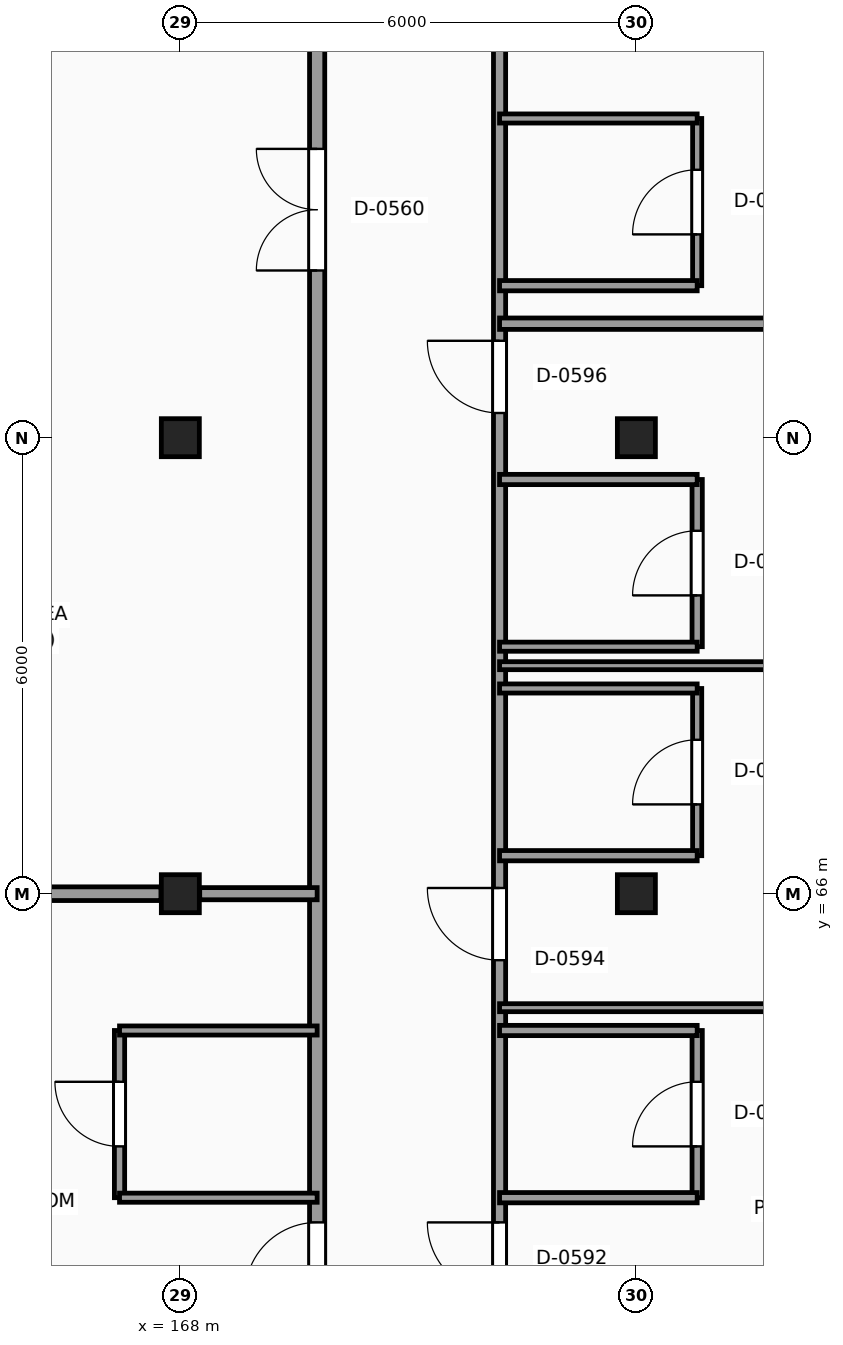
"""IFC4 building model, lengths in metres.
Left out: names, types, materials, properties, quantities, classifications, styles, units other than length and angle.
Written with IfcOpenShell. Run it as: python <this file> out.ifc"""

import sys

from ifc_helpers import new_model, si_unit, direction, frame, frame_2d, origin, origin_2d, place, context, subcontext, project, spatial, rectangle, extrude, element, fill, save


model = new_model("IFC4")
c1 = context("Model", 3, precision=1e-05, world=origin(), true_north=direction((0.0, 1.0)))
c2 = subcontext(c1, "Body", "Model", "MODEL_VIEW")
j1 = project(units=[si_unit("LENGTHUNIT", "METRE"), si_unit("PLANEANGLEUNIT", "RADIAN")], contexts=[c1])
p1 = place(None, origin())
s1 = spatial("IfcSite", under=j1, at=p1, CompositionType="ELEMENT")
p2 = place(p1, origin())
s2 = spatial("IfcBuilding", under=s1, at=p2, CompositionType="ELEMENT")
p3 = place(p2, frame((0.0, 0.0, 41.4)))
s3 = spatial("IfcBuildingStorey", under=s2, at=p3, CompositionType="ELEMENT", Elevation=41.4)
for number, where, z_axis, x_axis in (
    (1, (168.0, 66.0, 0.0), (0.0, 0.0, 1.0), (1.0, 0.0, 0.0)),
    (2, (168.0, 72.0, 0.0), (0.0, 0.0, 1.0), (1.0, 0.0, 0.0)),
    (3, (174.0, 66.0, 0.0), (0.0, 0.0, 1.0), (1.0, 0.0, 0.0)),
    (4, (174.0, 72.0, 0.0), (0.0, 0.0, 1.0), (1.0, 0.0, 0.0)),
):
    element("IfcColumn", number, at=place(p3, frame(where, z_axis=z_axis, x_axis=x_axis)), inside=s3, PredefinedType="COLUMN", context=c2, shape_type="SweptSolid", body=[
        extrude(rectangle(XDim=0.5, YDim=0.5, at=origin_2d()), origin(), (0.0, 0.0, 1.0), 3.3),
    ])
p4 = place(p3, frame((167.2, 62.0, 0.0), z_axis=(0.0, 0.0, 1.0), x_axis=(0.0, 1.0, 0.0)))
e5 = element("IfcWall", 5, at=p4, inside=s3, PredefinedType="PARTITIONING", context=c2, shape_type="SweptSolid", body=[
    extrude(rectangle(XDim=2.2, YDim=0.135, at=frame_2d((1.1, 0.0))), origin(), (0.0, 0.0, 1.0), 3.06),
])
p5 = place(p4, frame((0.675, 0.0, 0.0)))
e6 = element("IfcOpeningElement", 6, at=p5, cuts=e5, PredefinedType="OPENING", context=c2, shape_type="SweptSolid", body=[
    extrude(rectangle(XDim=0.85, YDim=2.1, at=frame_2d((0.425, 1.05))), frame((0.0, 0.078, 0.0), z_axis=(0.0, -1.0, 0.0), x_axis=(1.0, 0.0, 0.0)), (0.0, 0.0, 1.0), 0.155),
])
p6 = place(p3, frame((169.8, 42.275, 0.0), z_axis=(0.0, 0.0, 1.0), x_axis=(0.0, 1.0, 0.0)))
e7 = element("IfcWall", 7, at=p6, inside=s3, PredefinedType="PARTITIONING", context=c2, shape_type="SweptSolid", body=[
    extrude(rectangle(XDim=65.545, YDim=0.2, at=frame_2d((32.772, 0.0))), origin(), (0.0, 0.0, 1.0), 3.06),
])
p7 = place(p6, frame((50.125, 0.0, 0.0)))
e8 = element("IfcOpeningElement", 8, at=p7, cuts=e7, PredefinedType="OPENING", context=c2, shape_type="SweptSolid", body=[
    extrude(rectangle(XDim=1.2, YDim=2.2, at=frame_2d((0.6, 1.1))), frame((0.0, 0.11, 0.0), z_axis=(0.0, -1.0, 0.0), x_axis=(1.0, 0.0, 0.0)), (0.0, 0.0, 1.0), 0.22),
])
p8 = place(p6, frame((31.925, 0.0, 0.0)))
e9 = element("IfcOpeningElement", 9, at=p8, cuts=e7, PredefinedType="OPENING", context=c2, shape_type="SweptSolid", body=[
    extrude(rectangle(XDim=1.6, YDim=2.25, at=frame_2d((0.8, 1.125))), frame((0.0, 0.11, 0.0), z_axis=(0.0, -1.0, 0.0), x_axis=(1.0, 0.0, 0.0)), (0.0, 0.0, 1.0), 0.22),
])
p9 = place(p6, frame((0.4, 0.0, 0.0)))
e10 = element("IfcOpeningElement", 10, at=p9, cuts=e7, PredefinedType="OPENING", context=c2, shape_type="SweptSolid", body=[
    extrude(rectangle(XDim=0.95, YDim=2.1, at=frame_2d((0.475, 1.05))), frame((0.0, 0.11, 0.0), z_axis=(0.0, -1.0, 0.0), x_axis=(1.0, 0.0, 0.0)), (0.0, 0.0, 1.0), 0.22),
])
p10 = place(p6, frame((6.45, 0.0, 0.0)))
e11 = element("IfcOpeningElement", 11, at=p10, cuts=e7, PredefinedType="OPENING", context=c2, shape_type="SweptSolid", body=[
    extrude(rectangle(XDim=0.95, YDim=2.1, at=frame_2d((0.475, 1.05))), frame((0.0, 0.11, 0.0), z_axis=(0.0, -1.0, 0.0), x_axis=(1.0, 0.0, 0.0)), (0.0, 0.0, 1.0), 0.22),
])
p11 = place(p6, frame((12.45, 0.0, 0.0)))
e12 = element("IfcOpeningElement", 12, at=p11, cuts=e7, PredefinedType="OPENING", context=c2, shape_type="SweptSolid", body=[
    extrude(rectangle(XDim=0.95, YDim=2.1, at=frame_2d((0.475, 1.05))), frame((0.0, 0.11, 0.0), z_axis=(0.0, -1.0, 0.0), x_axis=(1.0, 0.0, 0.0)), (0.0, 0.0, 1.0), 0.22),
])
p12 = place(p6, frame((18.45, 0.0, 0.0)))
e13 = element("IfcOpeningElement", 13, at=p12, cuts=e7, PredefinedType="OPENING", context=c2, shape_type="SweptSolid", body=[
    extrude(rectangle(XDim=0.95, YDim=2.1, at=frame_2d((0.475, 1.05))), frame((0.0, 0.11, 0.0), z_axis=(0.0, -1.0, 0.0), x_axis=(1.0, 0.0, 0.0)), (0.0, 0.0, 1.0), 0.22),
])
p13 = place(p6, frame((54.45, 0.0, 0.0)))
e14 = element("IfcOpeningElement", 14, at=p13, cuts=e7, PredefinedType="OPENING", context=c2, shape_type="SweptSolid", body=[
    extrude(rectangle(XDim=0.95, YDim=2.1, at=frame_2d((0.475, 1.05))), frame((0.0, 0.11, 0.0), z_axis=(0.0, -1.0, 0.0), x_axis=(1.0, 0.0, 0.0)), (0.0, 0.0, 1.0), 0.22),
])
p14 = place(p6, frame((60.45, 0.0, 0.0)))
e15 = element("IfcOpeningElement", 15, at=p14, cuts=e7, PredefinedType="OPENING", context=c2, shape_type="SweptSolid", body=[
    extrude(rectangle(XDim=0.95, YDim=2.1, at=frame_2d((0.475, 1.05))), frame((0.0, 0.11, 0.0), z_axis=(0.0, -1.0, 0.0), x_axis=(1.0, 0.0, 0.0)), (0.0, 0.0, 1.0), 0.22),
])
p15 = place(p3, frame((172.2, 42.275, 0.0), z_axis=(0.0, 0.0, 1.0), x_axis=(0.0, 1.0, 0.0)))
e16 = element("IfcWall", 16, at=p15, inside=s3, PredefinedType="PARTITIONING", context=c2, shape_type="SweptSolid", body=[
    extrude(rectangle(XDim=65.545, YDim=0.16, at=frame_2d((32.772, 0.0))), origin(), (0.0, 0.0, 1.0), 3.06),
])
p16 = place(p15, frame((0.4, 0.0, 0.0)))
e17 = element("IfcOpeningElement", 17, at=p16, cuts=e16, PredefinedType="OPENING", context=c2, shape_type="SweptSolid", body=[
    extrude(rectangle(XDim=0.95, YDim=2.1, at=frame_2d((0.475, 1.05))), frame((0.0, 0.09, 0.0), z_axis=(0.0, -1.0, 0.0), x_axis=(1.0, 0.0, 0.0)), (0.0, 0.0, 1.0), 0.18),
])
p17 = place(p15, frame((4.85, 0.0, 0.0)))
e18 = element("IfcOpeningElement", 18, at=p17, cuts=e16, PredefinedType="OPENING", context=c2, shape_type="SweptSolid", body=[
    extrude(rectangle(XDim=0.95, YDim=2.1, at=frame_2d((0.475, 1.05))), frame((0.0, 0.09, 0.0), z_axis=(0.0, -1.0, 0.0), x_axis=(1.0, 0.0, 0.0)), (0.0, 0.0, 1.0), 0.18),
])
p18 = place(p15, frame((9.35, 0.0, 0.0)))
e19 = element("IfcOpeningElement", 19, at=p18, cuts=e16, PredefinedType="OPENING", context=c2, shape_type="SweptSolid", body=[
    extrude(rectangle(XDim=0.95, YDim=2.1, at=frame_2d((0.475, 1.05))), frame((0.0, 0.09, 0.0), z_axis=(0.0, -1.0, 0.0), x_axis=(1.0, 0.0, 0.0)), (0.0, 0.0, 1.0), 0.18),
])
p19 = place(p15, frame((18.45, 0.0, 0.0)))
e20 = element("IfcOpeningElement", 20, at=p19, cuts=e16, PredefinedType="OPENING", context=c2, shape_type="SweptSolid", body=[
    extrude(rectangle(XDim=0.95, YDim=2.1, at=frame_2d((0.475, 1.05))), frame((0.0, 0.09, 0.0), z_axis=(0.0, -1.0, 0.0), x_axis=(1.0, 0.0, 0.0)), (0.0, 0.0, 1.0), 0.18),
])
p20 = place(p15, frame((22.85, 0.0, 0.0)))
e21 = element("IfcOpeningElement", 21, at=p20, cuts=e16, PredefinedType="OPENING", context=c2, shape_type="SweptSolid", body=[
    extrude(rectangle(XDim=0.95, YDim=2.1, at=frame_2d((0.475, 1.05))), frame((0.0, 0.09, 0.0), z_axis=(0.0, -1.0, 0.0), x_axis=(1.0, 0.0, 0.0)), (0.0, 0.0, 1.0), 0.18),
])
p21 = place(p15, frame((30.05, 0.0, 0.0)))
e22 = element("IfcOpeningElement", 22, at=p21, cuts=e16, PredefinedType="OPENING", context=c2, shape_type="SweptSolid", body=[
    extrude(rectangle(XDim=0.95, YDim=2.1, at=frame_2d((0.475, 1.05))), frame((0.0, 0.09, 0.0), z_axis=(0.0, -1.0, 0.0), x_axis=(1.0, 0.0, 0.0)), (0.0, 0.0, 1.0), 0.18),
])
p22 = place(p15, frame((38.3, 0.0, 0.0)))
e23 = element("IfcOpeningElement", 23, at=p22, cuts=e16, PredefinedType="OPENING", context=c2, shape_type="SweptSolid", body=[
    extrude(rectangle(XDim=0.95, YDim=2.1, at=frame_2d((0.475, 1.05))), frame((0.0, 0.09, 0.0), z_axis=(0.0, -1.0, 0.0), x_axis=(1.0, 0.0, 0.0)), (0.0, 0.0, 1.0), 0.18),
])
p23 = place(p15, frame((40.85, 0.0, 0.0)))
e24 = element("IfcOpeningElement", 24, at=p23, cuts=e16, PredefinedType="OPENING", context=c2, shape_type="SweptSolid", body=[
    extrude(rectangle(XDim=0.95, YDim=2.1, at=frame_2d((0.475, 1.05))), frame((0.0, 0.09, 0.0), z_axis=(0.0, -1.0, 0.0), x_axis=(1.0, 0.0, 0.0)), (0.0, 0.0, 1.0), 0.18),
])
p24 = place(p15, frame((48.05, 0.0, 0.0)))
e25 = element("IfcOpeningElement", 25, at=p24, cuts=e16, PredefinedType="OPENING", context=c2, shape_type="SweptSolid", body=[
    extrude(rectangle(XDim=0.95, YDim=2.1, at=frame_2d((0.475, 1.05))), frame((0.0, 0.09, 0.0), z_axis=(0.0, -1.0, 0.0), x_axis=(1.0, 0.0, 0.0)), (0.0, 0.0, 1.0), 0.18),
])
p25 = place(p15, frame((52.25, 0.0, 0.0)))
e26 = element("IfcOpeningElement", 26, at=p25, cuts=e16, PredefinedType="OPENING", context=c2, shape_type="SweptSolid", body=[
    extrude(rectangle(XDim=0.95, YDim=2.1, at=frame_2d((0.475, 1.05))), frame((0.0, 0.09, 0.0), z_axis=(0.0, -1.0, 0.0), x_axis=(1.0, 0.0, 0.0)), (0.0, 0.0, 1.0), 0.18),
])
p26 = place(p15, frame((54.45, 0.0, 0.0)))
e27 = element("IfcOpeningElement", 27, at=p26, cuts=e16, PredefinedType="OPENING", context=c2, shape_type="SweptSolid", body=[
    extrude(rectangle(XDim=0.95, YDim=2.1, at=frame_2d((0.475, 1.05))), frame((0.0, 0.09, 0.0), z_axis=(0.0, -1.0, 0.0), x_axis=(1.0, 0.0, 0.0)), (0.0, 0.0, 1.0), 0.18),
])
p27 = place(p15, frame((60.45, 0.0, 0.0)))
e28 = element("IfcOpeningElement", 28, at=p27, cuts=e16, PredefinedType="OPENING", context=c2, shape_type="SweptSolid", body=[
    extrude(rectangle(XDim=0.95, YDim=2.1, at=frame_2d((0.475, 1.05))), frame((0.0, 0.09, 0.0), z_axis=(0.0, -1.0, 0.0), x_axis=(1.0, 0.0, 0.0)), (0.0, 0.0, 1.0), 0.18),
])
p28 = place(p3, frame((174.8, 62.0, 0.0), z_axis=(0.0, 0.0, 1.0), x_axis=(0.0, 1.0, 0.0)))
e29 = element("IfcWall", 29, at=p28, inside=s3, PredefinedType="PARTITIONING", context=c2, shape_type="SweptSolid", body=[
    extrude(rectangle(XDim=2.2, YDim=0.135, at=frame_2d((1.1, 0.0))), origin(), (0.0, 0.0, 1.0), 3.06),
])
p29 = place(p28, frame((0.675, 0.0, 0.0)))
e30 = element("IfcOpeningElement", 30, at=p29, cuts=e29, PredefinedType="OPENING", context=c2, shape_type="SweptSolid", body=[
    extrude(rectangle(XDim=0.85, YDim=2.1, at=frame_2d((0.425, 1.05))), frame((0.0, 0.078, 0.0), z_axis=(0.0, -1.0, 0.0), x_axis=(1.0, 0.0, 0.0)), (0.0, 0.0, 1.0), 0.155),
])
p30 = place(p3, frame((174.8, 66.5, 0.0), z_axis=(0.0, 0.0, 1.0), x_axis=(0.0, 1.0, 0.0)))
e31 = element("IfcWall", 31, at=p30, inside=s3, PredefinedType="PARTITIONING", context=c2, shape_type="SweptSolid", body=[
    extrude(rectangle(XDim=2.2, YDim=0.12, at=frame_2d((1.1, 0.0))), origin(), (0.0, 0.0, 1.0), 3.06),
])
p31 = place(p30, frame((0.675, 0.0, 0.0)))
e32 = element("IfcOpeningElement", 32, at=p31, cuts=e31, PredefinedType="OPENING", context=c2, shape_type="SweptSolid", body=[
    extrude(rectangle(XDim=0.85, YDim=2.1, at=frame_2d((0.425, 1.05))), frame((0.0, 0.07, 0.0), z_axis=(0.0, -1.0, 0.0), x_axis=(1.0, 0.0, 0.0)), (0.0, 0.0, 1.0), 0.14),
])
p32 = place(p3, frame((174.8, 69.25, 0.0), z_axis=(0.0, 0.0, 1.0), x_axis=(0.0, 1.0, 0.0)))
e33 = element("IfcWall", 33, at=p32, inside=s3, PredefinedType="PARTITIONING", context=c2, shape_type="SweptSolid", body=[
    extrude(rectangle(XDim=2.2, YDim=0.135, at=frame_2d((1.1, 0.0))), origin(), (0.0, 0.0, 1.0), 3.06),
])
p33 = place(p32, frame((0.675, 0.0, 0.0)))
e34 = element("IfcOpeningElement", 34, at=p33, cuts=e33, PredefinedType="OPENING", context=c2, shape_type="SweptSolid", body=[
    extrude(rectangle(XDim=0.85, YDim=2.1, at=frame_2d((0.425, 1.05))), frame((0.0, 0.078, 0.0), z_axis=(0.0, -1.0, 0.0), x_axis=(1.0, 0.0, 0.0)), (0.0, 0.0, 1.0), 0.155),
])
p34 = place(p3, frame((174.8, 74.0, 0.0), z_axis=(0.0, 0.0, 1.0), x_axis=(0.0, 1.0, 0.0)))
e35 = element("IfcWall", 35, at=p34, inside=s3, PredefinedType="PARTITIONING", context=c2, shape_type="SweptSolid", body=[
    extrude(rectangle(XDim=2.2, YDim=0.12, at=frame_2d((1.1, 0.0))), origin(), (0.0, 0.0, 1.0), 3.06),
])
p35 = place(p34, frame((0.675, 0.0, 0.0)))
e36 = element("IfcOpeningElement", 36, at=p35, cuts=e35, PredefinedType="OPENING", context=c2, shape_type="SweptSolid", body=[
    extrude(rectangle(XDim=0.85, YDim=2.1, at=frame_2d((0.425, 1.05))), frame((0.0, 0.07, 0.0), z_axis=(0.0, -1.0, 0.0), x_axis=(1.0, 0.0, 0.0)), (0.0, 0.0, 1.0), 0.14),
])
p36 = place(p3, frame((167.2, 62.0, 0.0), z_axis=(0.0, 0.0, 1.0), x_axis=(1.0, 0.0, 0.0)))
e37 = element("IfcWall", 37, at=p36, inside=s3, PredefinedType="PARTITIONING", context=c2, shape_type="SweptSolid", body=[
    extrude(rectangle(XDim=2.6, YDim=0.12, at=frame_2d((1.3, 0.0))), origin(), (0.0, 0.0, 1.0), 3.06),
])
p37 = place(p3, frame((172.2, 62.0, 0.0), z_axis=(0.0, 0.0, 1.0), x_axis=(1.0, 0.0, 0.0)))
e38 = element("IfcWall", 38, at=p37, inside=s3, PredefinedType="PARTITIONING", context=c2, shape_type="SweptSolid", body=[
    extrude(rectangle(XDim=2.6, YDim=0.135, at=frame_2d((1.3, 0.0))), origin(), (0.0, 0.0, 1.0), 3.06),
])
p38 = place(p3, frame((167.2, 64.2, 0.0), z_axis=(0.0, 0.0, 1.0), x_axis=(1.0, 0.0, 0.0)))
e39 = element("IfcWall", 39, at=p38, inside=s3, PredefinedType="PARTITIONING", context=c2, shape_type="SweptSolid", body=[
    extrude(rectangle(XDim=2.6, YDim=0.12, at=frame_2d((1.3, 0.0))), origin(), (0.0, 0.0, 1.0), 3.06),
])
p39 = place(p3, frame((172.2, 64.2, 0.0), z_axis=(0.0, 0.0, 1.0), x_axis=(1.0, 0.0, 0.0)))
e40 = element("IfcWall", 40, at=p39, inside=s3, PredefinedType="PARTITIONING", context=c2, shape_type="SweptSolid", body=[
    extrude(rectangle(XDim=2.6, YDim=0.135, at=frame_2d((1.3, 0.0))), origin(), (0.0, 0.0, 1.0), 3.06),
])
p40 = place(p3, frame((172.2, 64.5, 0.0), z_axis=(0.0, 0.0, 1.0), x_axis=(1.0, 0.0, 0.0)))
e41 = element("IfcWall", 41, at=p40, inside=s3, PredefinedType="PARTITIONING", context=c2, shape_type="SweptSolid", body=[
    extrude(rectangle(XDim=7.585, YDim=0.105, at=frame_2d((3.792, 0.0))), origin(), (0.0, 0.0, 1.0), 3.06),
])
p41 = place(p3, frame((162.28, 66.0, 0.0), z_axis=(0.0, 0.0, 1.0), x_axis=(1.0, 0.0, 0.0)))
e42 = element("IfcWall", 42, at=p41, inside=s3, PredefinedType="PARTITIONING", context=c2, shape_type="SweptSolid", body=[
    extrude(rectangle(XDim=5.465, YDim=0.18, at=frame_2d((2.732, 0.0))), origin(), (0.0, 0.0, 1.0), 2.26),
])
p42 = place(p3, frame((168.255, 66.0, 0.0), z_axis=(0.0, 0.0, 1.0), x_axis=(1.0, 0.0, 0.0)))
e43 = element("IfcWall", 43, at=p42, inside=s3, PredefinedType="PARTITIONING", context=c2, shape_type="SweptSolid", body=[
    extrude(rectangle(XDim=1.545, YDim=0.16, at=frame_2d((0.772, 0.0))), origin(), (0.0, 0.0, 1.0), 2.26),
])
p43 = place(p3, frame((172.2, 66.5, 0.0), z_axis=(0.0, 0.0, 1.0), x_axis=(1.0, 0.0, 0.0)))
e44 = element("IfcWall", 44, at=p43, inside=s3, PredefinedType="PARTITIONING", context=c2, shape_type="SweptSolid", body=[
    extrude(rectangle(XDim=2.6, YDim=0.135, at=frame_2d((1.3, 0.0))), origin(), (0.0, 0.0, 1.0), 3.06),
])
p44 = place(p3, frame((172.2, 68.7, 0.0), z_axis=(0.0, 0.0, 1.0), x_axis=(1.0, 0.0, 0.0)))
e45 = element("IfcWall", 45, at=p44, inside=s3, PredefinedType="PARTITIONING", context=c2, shape_type="SweptSolid", body=[
    extrude(rectangle(XDim=2.6, YDim=0.12, at=frame_2d((1.3, 0.0))), origin(), (0.0, 0.0, 1.0), 3.06),
])
p45 = place(p3, frame((172.2, 69.0, 0.0), z_axis=(0.0, 0.0, 1.0), x_axis=(1.0, 0.0, 0.0)))
e46 = element("IfcWall", 46, at=p45, inside=s3, PredefinedType="PARTITIONING", context=c2, shape_type="SweptSolid", body=[
    extrude(rectangle(XDim=7.525, YDim=0.105, at=frame_2d((3.763, 0.0))), origin(), (0.0, 0.0, 1.0), 3.06),
])
p46 = place(p3, frame((172.2, 69.25, 0.0), z_axis=(0.0, 0.0, 1.0), x_axis=(1.0, 0.0, 0.0)))
e47 = element("IfcWall", 47, at=p46, inside=s3, PredefinedType="PARTITIONING", context=c2, shape_type="SweptSolid", body=[
    extrude(rectangle(XDim=2.6, YDim=0.12, at=frame_2d((1.3, 0.0))), origin(), (0.0, 0.0, 1.0), 3.06),
])
p47 = place(p3, frame((172.2, 71.45, 0.0), z_axis=(0.0, 0.0, 1.0), x_axis=(1.0, 0.0, 0.0)))
e48 = element("IfcWall", 48, at=p47, inside=s3, PredefinedType="PARTITIONING", context=c2, shape_type="SweptSolid", body=[
    extrude(rectangle(XDim=2.6, YDim=0.135, at=frame_2d((1.3, 0.0))), origin(), (0.0, 0.0, 1.0), 3.06),
])
p48 = place(p3, frame((172.2, 73.5, 0.0), z_axis=(0.0, 0.0, 1.0), x_axis=(1.0, 0.0, 0.0)))
e49 = element("IfcWall", 49, at=p48, inside=s3, PredefinedType="PARTITIONING", context=c2, shape_type="SweptSolid", body=[
    extrude(rectangle(XDim=7.545, YDim=0.15, at=frame_2d((3.772, 0.0))), origin(), (0.0, 0.0, 1.0), 3.06),
])
p49 = place(p3, frame((172.2, 74.0, 0.0), z_axis=(0.0, 0.0, 1.0), x_axis=(1.0, 0.0, 0.0)))
e50 = element("IfcWall", 50, at=p49, inside=s3, PredefinedType="PARTITIONING", context=c2, shape_type="SweptSolid", body=[
    extrude(rectangle(XDim=2.6, YDim=0.135, at=frame_2d((1.3, 0.0))), origin(), (0.0, 0.0, 1.0), 3.06),
])
p50 = place(p3, frame((172.2, 76.2, 0.0), z_axis=(0.0, 0.0, 1.0), x_axis=(1.0, 0.0, 0.0)))
e51 = element("IfcWall", 51, at=p50, inside=s3, PredefinedType="PARTITIONING", context=c2, shape_type="SweptSolid", body=[
    extrude(rectangle(XDim=2.6, YDim=0.12, at=frame_2d((1.3, 0.0))), origin(), (0.0, 0.0, 1.0), 3.06),
])
p51 = place(p8, origin())
e52 = element("IfcDoor", 52, at=p51, inside=s3, OperationType="DOUBLE_DOOR_SINGLE_SWING", PredefinedType="DOOR", context=c2, shape_type="SweptSolid", body=[
    extrude(rectangle(XDim=1.6, YDim=2.25, at=frame_2d((0.8, 1.125))), frame((0.0, 0.025, 0.0), z_axis=(0.0, -1.0, 0.0), x_axis=(1.0, 0.0, 0.0)), (0.0, 0.0, 1.0), 0.05),
])
fill(e9, e52)
p52 = place(p29, origin())
e53 = element("IfcDoor", 53, at=p52, inside=s3, OperationType="SINGLE_SWING_LEFT", PredefinedType="DOOR", context=c2, shape_type="SweptSolid", body=[
    extrude(rectangle(XDim=0.85, YDim=2.1, at=frame_2d((0.425, 1.05))), frame((0.0, 0.025, 0.0), z_axis=(0.0, -1.0, 0.0), x_axis=(1.0, 0.0, 0.0)), (0.0, 0.0, 1.0), 0.05),
])
fill(e30, e53)
p53 = place(p19, origin())
e54 = element("IfcDoor", 54, at=p53, inside=s3, OperationType="SINGLE_SWING_RIGHT", PredefinedType="DOOR", context=c2, shape_type="SweptSolid", body=[
    extrude(rectangle(XDim=0.95, YDim=2.1, at=frame_2d((0.475, 1.05))), frame((0.0, 0.025, 0.0), z_axis=(0.0, -1.0, 0.0), x_axis=(1.0, 0.0, 0.0)), (0.0, 0.0, 1.0), 0.05),
])
fill(e20, e54)
p54 = place(p31, origin())
e55 = element("IfcDoor", 55, at=p54, inside=s3, OperationType="SINGLE_SWING_LEFT", PredefinedType="DOOR", context=c2, shape_type="SweptSolid", body=[
    extrude(rectangle(XDim=0.85, YDim=2.1, at=frame_2d((0.425, 1.05))), frame((0.0, 0.025, 0.0), z_axis=(0.0, -1.0, 0.0), x_axis=(1.0, 0.0, 0.0)), (0.0, 0.0, 1.0), 0.05),
])
fill(e32, e55)
p55 = place(p20, origin())
e56 = element("IfcDoor", 56, at=p55, inside=s3, OperationType="SINGLE_SWING_RIGHT", PredefinedType="DOOR", context=c2, shape_type="SweptSolid", body=[
    extrude(rectangle(XDim=0.95, YDim=2.1, at=frame_2d((0.475, 1.05))), frame((0.0, 0.025, 0.0), z_axis=(0.0, -1.0, 0.0), x_axis=(1.0, 0.0, 0.0)), (0.0, 0.0, 1.0), 0.05),
])
fill(e21, e56)
p56 = place(p33, origin())
e57 = element("IfcDoor", 57, at=p56, inside=s3, OperationType="SINGLE_SWING_LEFT", PredefinedType="DOOR", context=c2, shape_type="SweptSolid", body=[
    extrude(rectangle(XDim=0.85, YDim=2.1, at=frame_2d((0.425, 1.05))), frame((0.0, 0.025, 0.0), z_axis=(0.0, -1.0, 0.0), x_axis=(1.0, 0.0, 0.0)), (0.0, 0.0, 1.0), 0.05),
])
fill(e34, e57)
p57 = place(p21, origin())
e58 = element("IfcDoor", 58, at=p57, inside=s3, OperationType="SINGLE_SWING_RIGHT", PredefinedType="DOOR", context=c2, shape_type="SweptSolid", body=[
    extrude(rectangle(XDim=0.95, YDim=2.1, at=frame_2d((0.475, 1.05))), frame((0.0, 0.025, 0.0), z_axis=(0.0, -1.0, 0.0), x_axis=(1.0, 0.0, 0.0)), (0.0, 0.0, 1.0), 0.05),
])
fill(e22, e58)
p58 = place(p35, origin())
e59 = element("IfcDoor", 59, at=p58, inside=s3, OperationType="SINGLE_SWING_LEFT", PredefinedType="DOOR", context=c2, shape_type="SweptSolid", body=[
    extrude(rectangle(XDim=0.85, YDim=2.1, at=frame_2d((0.425, 1.05))), frame((0.0, 0.025, 0.0), z_axis=(0.0, -1.0, 0.0), x_axis=(1.0, 0.0, 0.0)), (0.0, 0.0, 1.0), 0.05),
])
fill(e36, e59)
p59 = place(p5, origin())
e60 = element("IfcDoor", 60, at=p59, inside=s3, OperationType="SINGLE_SWING_RIGHT", PredefinedType="DOOR", context=c2, shape_type="SweptSolid", body=[
    extrude(rectangle(XDim=0.85, YDim=2.1, at=frame_2d((0.425, 1.05))), frame((0.0, 0.025, 0.0), z_axis=(0.0, -1.0, 0.0), x_axis=(1.0, 0.0, 0.0)), (0.0, 0.0, 1.0), 0.05),
])
fill(e6, e60)
p60 = place(p12, origin())
e61 = element("IfcDoor", 61, at=p60, inside=s3, OperationType="SINGLE_SWING_LEFT", PredefinedType="DOOR", context=c2, shape_type="SweptSolid", body=[
    extrude(rectangle(XDim=0.95, YDim=2.1, at=frame_2d((0.475, 1.05))), frame((0.0, 0.025, 0.0), z_axis=(0.0, -1.0, 0.0), x_axis=(1.0, 0.0, 0.0)), (0.0, 0.0, 1.0), 0.05),
])
fill(e13, e61)
save(model, sys.argv[1])
